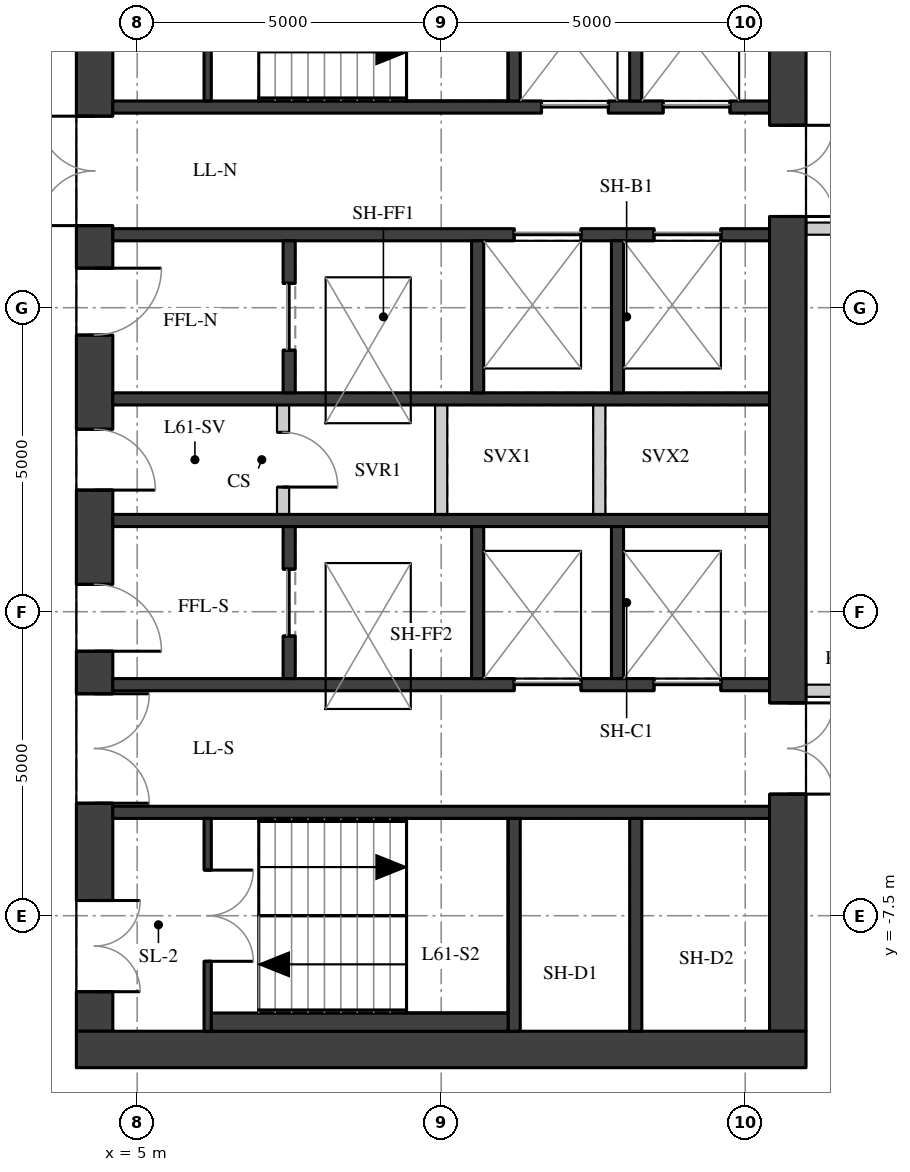
"""IFC4 building model, lengths in metres.
Left out: names, types, materials, properties, quantities, classifications, styles, units other than length and angle.
Written with IfcOpenShell. Run it as: python <this file> out.ifc"""

import sys

from ifc_helpers import new_model, si_unit, direction, frame, frame_2d, origin, place, context, subcontext, project, spatial, rectangle, extrude, element, fill, save


model = new_model("IFC4")
c1 = context("Model", 3, precision=1e-05, world=origin(), true_north=direction((0.0, 1.0)))
c2 = subcontext(c1, "Body", "Model", "MODEL_VIEW")
j1 = project(units=[si_unit("LENGTHUNIT", "METRE"), si_unit("PLANEANGLEUNIT", "RADIAN")], contexts=[c1])
p1 = place(None, origin())
s1 = spatial("IfcSite", under=j1, at=p1, CompositionType="ELEMENT")
p2 = place(p1, origin())
s2 = spatial("IfcBuilding", under=s1, at=p2, CompositionType="ELEMENT")
p3 = place(p2, frame((0.0, 0.0, 215.6)))
s3 = spatial("IfcBuildingStorey", under=s2, at=p3, CompositionType="ELEMENT", Elevation=215.6)
p4 = place(p3, frame((4.3, -9.4, 0.0), z_axis=(0.0, 0.0, 1.0), x_axis=(0.0, 1.0, 0.0)))
e1 = element("IfcWall", 1, at=p4, inside=s3, PredefinedType="SHEAR", context=c2, shape_type="SweptSolid", body=[
    extrude(rectangle(XDim=18.8, YDim=0.6, at=frame_2d((9.4, 0.0))), origin(), (0.0, 0.0, 1.0), 3.02),
])
p5 = place(p4, frame((0.65, 0.0, 0.0)))
e2 = element("IfcOpeningElement", 2, at=p5, cuts=e1, PredefinedType="OPENING", context=c2, shape_type="SweptSolid", body=[
    extrude(rectangle(XDim=1.5, YDim=2.1, at=frame_2d((0.75, 1.05))), frame((0.0, 0.31, 0.0), z_axis=(0.0, -1.0, 0.0), x_axis=(1.0, 0.0, 0.0)), (0.0, 0.0, 1.0), 0.62),
])
p6 = place(p4, frame((3.75, 0.0, 0.0)))
e3 = element("IfcOpeningElement", 3, at=p6, cuts=e1, PredefinedType="OPENING", context=c2, shape_type="SweptSolid", body=[
    extrude(rectangle(XDim=1.8, YDim=2.1, at=frame_2d((0.9, 1.05))), frame((0.0, 0.31, 0.0), z_axis=(0.0, -1.0, 0.0), x_axis=(1.0, 0.0, 0.0)), (0.0, 0.0, 1.0), 0.62),
])
p7 = place(p4, frame((6.25, 0.0, 0.0)))
e4 = element("IfcOpeningElement", 4, at=p7, cuts=e1, PredefinedType="OPENING", context=c2, shape_type="SweptSolid", body=[
    extrude(rectangle(XDim=1.1, YDim=2.1, at=frame_2d((0.55, 1.05))), frame((0.0, 0.31, 0.0), z_axis=(0.0, -1.0, 0.0), x_axis=(1.0, 0.0, 0.0)), (0.0, 0.0, 1.0), 0.62),
])
p8 = place(p4, frame((8.9, 0.0, 0.0)))
e5 = element("IfcOpeningElement", 5, at=p8, cuts=e1, PredefinedType="OPENING", context=c2, shape_type="SweptSolid", body=[
    extrude(rectangle(XDim=1.0, YDim=2.1, at=frame_2d((0.5, 1.05))), frame((0.0, 0.31, 0.0), z_axis=(0.0, -1.0, 0.0), x_axis=(1.0, 0.0, 0.0)), (0.0, 0.0, 1.0), 0.62),
])
p9 = place(p4, frame((11.45, 0.0, 0.0)))
e6 = element("IfcOpeningElement", 6, at=p9, cuts=e1, PredefinedType="OPENING", context=c2, shape_type="SweptSolid", body=[
    extrude(rectangle(XDim=1.1, YDim=2.1, at=frame_2d((0.55, 1.05))), frame((0.0, 0.31, 0.0), z_axis=(0.0, -1.0, 0.0), x_axis=(1.0, 0.0, 0.0)), (0.0, 0.0, 1.0), 0.62),
])
p10 = place(p4, frame((13.25, 0.0, 0.0)))
e7 = element("IfcOpeningElement", 7, at=p10, cuts=e1, PredefinedType="OPENING", context=c2, shape_type="SweptSolid", body=[
    extrude(rectangle(XDim=1.8, YDim=2.1, at=frame_2d((0.9, 1.05))), frame((0.0, 0.31, 0.0), z_axis=(0.0, -1.0, 0.0), x_axis=(1.0, 0.0, 0.0)), (0.0, 0.0, 1.0), 0.62),
])
p11 = place(p4, frame((16.65, 0.0, 0.0)))
e8 = element("IfcOpeningElement", 8, at=p11, cuts=e1, PredefinedType="OPENING", context=c2, shape_type="SweptSolid", body=[
    extrude(rectangle(XDim=1.5, YDim=2.1, at=frame_2d((0.75, 1.05))), frame((0.0, 0.31, 0.0), z_axis=(0.0, -1.0, 0.0), x_axis=(1.0, 0.0, 0.0)), (0.0, 0.0, 1.0), 0.62),
])
p12 = place(p3, frame((15.7, -9.4, 0.0), z_axis=(0.0, 0.0, 1.0), x_axis=(0.0, 1.0, 0.0)))
e9 = element("IfcWall", 9, at=p12, inside=s3, PredefinedType="SHEAR", context=c2, shape_type="SweptSolid", body=[
    extrude(rectangle(XDim=18.8, YDim=0.6, at=frame_2d((9.4, 0.0))), origin(), (0.0, 0.0, 1.0), 3.02),
])
p13 = place(p12, frame((13.4, 0.0, 0.0)))
e10 = element("IfcOpeningElement", 10, at=p13, cuts=e9, PredefinedType="OPENING", context=c2, shape_type="SweptSolid", body=[
    extrude(rectangle(XDim=1.5, YDim=2.1, at=frame_2d((0.75, 1.05))), frame((0.0, 0.31, 0.0), z_axis=(0.0, -1.0, 0.0), x_axis=(1.0, 0.0, 0.0)), (0.0, 0.0, 1.0), 0.62),
])
p14 = place(p12, frame((3.9, 0.0, 0.0)))
e11 = element("IfcOpeningElement", 11, at=p14, cuts=e9, PredefinedType="OPENING", context=c2, shape_type="SweptSolid", body=[
    extrude(rectangle(XDim=1.5, YDim=2.1, at=frame_2d((0.75, 1.05))), frame((0.0, 0.31, 0.0), z_axis=(0.0, -1.0, 0.0), x_axis=(1.0, 0.0, 0.0)), (0.0, 0.0, 1.0), 0.62),
])
p15 = place(p3, frame((4.0, -9.7, 0.0), z_axis=(0.0, 0.0, 1.0), x_axis=(1.0, 0.0, 0.0)))
e12 = element("IfcWall", 12, at=p15, inside=s3, PredefinedType="SHEAR", context=c2, shape_type="SweptSolid", body=[
    extrude(rectangle(XDim=12.0, YDim=0.6, at=frame_2d((6.0, 0.0))), origin(), (0.0, 0.0, 1.0), 3.02),
])
p16 = place(p3, frame((4.6, 5.8, 0.0), z_axis=(0.0, 0.0, 1.0), x_axis=(1.0, 0.0, 0.0)))
e13 = element("IfcWall", 13, at=p16, inside=s3, PredefinedType="SHEAR", context=c2, shape_type="SweptSolid", body=[
    extrude(rectangle(XDim=10.8, YDim=0.2, at=frame_2d((5.4, 0.0))), origin(), (0.0, 0.0, 1.0), 3.02),
])
p17 = place(p16, frame((7.05, 0.0, 0.0)))
e14 = element("IfcOpeningElement", 14, at=p17, cuts=e13, PredefinedType="OPENING", context=c2, shape_type="SweptSolid", body=[
    extrude(rectangle(XDim=1.1, YDim=2.1, at=frame_2d((0.55, 1.05))), frame((0.0, 0.11, 0.0), z_axis=(0.0, -1.0, 0.0), x_axis=(1.0, 0.0, 0.0)), (0.0, 0.0, 1.0), 0.22),
])
p18 = place(p16, frame((9.05, 0.0, 0.0)))
e15 = element("IfcOpeningElement", 15, at=p18, cuts=e13, PredefinedType="OPENING", context=c2, shape_type="SweptSolid", body=[
    extrude(rectangle(XDim=1.1, YDim=2.1, at=frame_2d((0.55, 1.05))), frame((0.0, 0.11, 0.0), z_axis=(0.0, -1.0, 0.0), x_axis=(1.0, 0.0, 0.0)), (0.0, 0.0, 1.0), 0.22),
])
p19 = place(p3, frame((4.6, 3.7, 0.0), z_axis=(0.0, 0.0, 1.0), x_axis=(1.0, 0.0, 0.0)))
e16 = element("IfcWall", 16, at=p19, inside=s3, PredefinedType="SHEAR", context=c2, shape_type="SweptSolid", body=[
    extrude(rectangle(XDim=10.8, YDim=0.2, at=frame_2d((5.4, 0.0))), origin(), (0.0, 0.0, 1.0), 3.02),
])
p20 = place(p19, frame((6.6, 0.0, 0.0)))
e17 = element("IfcOpeningElement", 17, at=p20, cuts=e16, PredefinedType="OPENING", context=c2, shape_type="SweptSolid", body=[
    extrude(rectangle(XDim=1.1, YDim=2.1, at=frame_2d((0.55, 1.05))), frame((0.0, 0.11, 0.0), z_axis=(0.0, -1.0, 0.0), x_axis=(1.0, 0.0, 0.0)), (0.0, 0.0, 1.0), 0.22),
])
p21 = place(p19, frame((8.9, 0.0, 0.0)))
e18 = element("IfcOpeningElement", 18, at=p21, cuts=e16, PredefinedType="OPENING", context=c2, shape_type="SweptSolid", body=[
    extrude(rectangle(XDim=1.1, YDim=2.1, at=frame_2d((0.55, 1.05))), frame((0.0, 0.11, 0.0), z_axis=(0.0, -1.0, 0.0), x_axis=(1.0, 0.0, 0.0)), (0.0, 0.0, 1.0), 0.22),
])
for number, where, z_axis, x_axis in (
    (19, (4.6, 1.0, 0.0), (0.0, 0.0, 1.0), (1.0, 0.0, 0.0)),
    (20, (4.6, -1.0, 0.0), (0.0, 0.0, 1.0), (1.0, 0.0, 0.0)),
):
    element("IfcWall", number, at=place(p3, frame(where, z_axis=z_axis, x_axis=x_axis)), inside=s3, PredefinedType="SHEAR", context=c2, shape_type="SweptSolid", body=[
        extrude(rectangle(XDim=10.8, YDim=0.2, at=frame_2d((5.4, 0.0))), origin(), (0.0, 0.0, 1.0), 3.02),
    ])
p22 = place(p3, frame((4.6, -3.7, 0.0), z_axis=(0.0, 0.0, 1.0), x_axis=(1.0, 0.0, 0.0)))
e21 = element("IfcWall", 21, at=p22, inside=s3, PredefinedType="SHEAR", context=c2, shape_type="SweptSolid", body=[
    extrude(rectangle(XDim=10.8, YDim=0.2, at=frame_2d((5.4, 0.0))), origin(), (0.0, 0.0, 1.0), 3.02),
])
p23 = place(p22, frame((6.6, 0.0, 0.0)))
e22 = element("IfcOpeningElement", 22, at=p23, cuts=e21, PredefinedType="OPENING", context=c2, shape_type="SweptSolid", body=[
    extrude(rectangle(XDim=1.1, YDim=2.1, at=frame_2d((0.55, 1.05))), frame((0.0, 0.11, 0.0), z_axis=(0.0, -1.0, 0.0), x_axis=(1.0, 0.0, 0.0)), (0.0, 0.0, 1.0), 0.22),
])
p24 = place(p22, frame((8.9, 0.0, 0.0)))
e23 = element("IfcOpeningElement", 23, at=p24, cuts=e21, PredefinedType="OPENING", context=c2, shape_type="SweptSolid", body=[
    extrude(rectangle(XDim=1.1, YDim=2.1, at=frame_2d((0.55, 1.05))), frame((0.0, 0.11, 0.0), z_axis=(0.0, -1.0, 0.0), x_axis=(1.0, 0.0, 0.0)), (0.0, 0.0, 1.0), 0.22),
])
p25 = place(p3, frame((4.6, -5.8, 0.0), z_axis=(0.0, 0.0, 1.0), x_axis=(1.0, 0.0, 0.0)))
e24 = element("IfcWall", 24, at=p25, inside=s3, PredefinedType="SHEAR", context=c2, shape_type="SweptSolid", body=[
    extrude(rectangle(XDim=10.8, YDim=0.2, at=frame_2d((5.4, 0.0))), origin(), (0.0, 0.0, 1.0), 3.02),
])
for number, where, z_axis, x_axis in (
    (25, (11.2, 5.9, 0.0), (0.0, 0.0, 1.0), (0.0, 1.0, 0.0)),
    (26, (11.2, -9.4, 0.0), (0.0, 0.0, 1.0), (0.0, 1.0, 0.0)),
    (27, (13.2, 5.9, 0.0), (0.0, 0.0, 1.0), (0.0, 1.0, 0.0)),
    (28, (13.2, -9.4, 0.0), (0.0, 0.0, 1.0), (0.0, 1.0, 0.0)),
):
    element("IfcWall", number, at=place(p3, frame(where, z_axis=z_axis, x_axis=x_axis)), inside=s3, PredefinedType="SHEAR", context=c2, shape_type="SweptSolid", body=[
        extrude(rectangle(XDim=3.5, YDim=0.2, at=frame_2d((1.75, 0.0))), origin(), (0.0, 0.0, 1.0), 3.02),
    ])
p26 = place(p3, frame((7.5, 1.1, 0.0), z_axis=(0.0, 0.0, 1.0), x_axis=(0.0, 1.0, 0.0)))
e29 = element("IfcWall", 29, at=p26, inside=s3, PredefinedType="SHEAR", context=c2, shape_type="SweptSolid", body=[
    extrude(rectangle(XDim=2.5, YDim=0.2, at=frame_2d((1.25, 0.0))), origin(), (0.0, 0.0, 1.0), 3.02),
])
p27 = place(p26, frame((0.7, 0.0, 0.0)))
e30 = element("IfcOpeningElement", 30, at=p27, cuts=e29, PredefinedType="OPENING", context=c2, shape_type="SweptSolid", body=[
    extrude(rectangle(XDim=1.1, YDim=2.1, at=frame_2d((0.55, 1.05))), frame((0.0, 0.11, 0.0), z_axis=(0.0, -1.0, 0.0), x_axis=(1.0, 0.0, 0.0)), (0.0, 0.0, 1.0), 0.22),
])
p28 = place(p3, frame((7.5, -3.6, 0.0), z_axis=(0.0, 0.0, 1.0), x_axis=(0.0, 1.0, 0.0)))
e31 = element("IfcWall", 31, at=p28, inside=s3, PredefinedType="SHEAR", context=c2, shape_type="SweptSolid", body=[
    extrude(rectangle(XDim=2.5, YDim=0.2, at=frame_2d((1.25, 0.0))), origin(), (0.0, 0.0, 1.0), 3.02),
])
p29 = place(p28, frame((0.7, 0.0, 0.0)))
e32 = element("IfcOpeningElement", 32, at=p29, cuts=e31, PredefinedType="OPENING", context=c2, shape_type="SweptSolid", body=[
    extrude(rectangle(XDim=1.1, YDim=2.1, at=frame_2d((0.55, 1.05))), frame((0.0, 0.11, 0.0), z_axis=(0.0, -1.0, 0.0), x_axis=(1.0, 0.0, 0.0)), (0.0, 0.0, 1.0), 0.22),
])
for number, where, z_axis, x_axis in (
    (33, (10.6, 1.1, 0.0), (0.0, 0.0, 1.0), (0.0, 1.0, 0.0)),
    (34, (10.6, -3.6, 0.0), (0.0, 0.0, 1.0), (0.0, 1.0, 0.0)),
    (35, (12.9, 1.1, 0.0), (0.0, 0.0, 1.0), (0.0, 1.0, 0.0)),
    (36, (12.9, -3.6, 0.0), (0.0, 0.0, 1.0), (0.0, 1.0, 0.0)),
):
    element("IfcWall", number, at=place(p3, frame(where, z_axis=z_axis, x_axis=x_axis)), inside=s3, PredefinedType="SHEAR", context=c2, shape_type="SweptSolid", body=[
        extrude(rectangle(XDim=2.5, YDim=0.2, at=frame_2d((1.25, 0.0))), origin(), (0.0, 0.0, 1.0), 3.02),
    ])
p30 = place(p3, frame((6.16, 5.9, 0.0), z_axis=(0.0, 0.0, 1.0), x_axis=(0.0, 1.0, 0.0)))
e37 = element("IfcWall", 37, at=p30, inside=s3, PredefinedType="SHEAR", context=c2, shape_type="SweptSolid", body=[
    extrude(rectangle(XDim=3.5, YDim=0.12, at=frame_2d((1.75, 0.0))), origin(), (0.0, 0.0, 1.0), 3.02),
])
p31 = place(p30, frame((0.85, 0.0, 0.0)))
e38 = element("IfcOpeningElement", 38, at=p31, cuts=e37, PredefinedType="OPENING", context=c2, shape_type="SweptSolid", body=[
    extrude(rectangle(XDim=1.5, YDim=2.1, at=frame_2d((0.75, 1.05))), frame((0.0, 0.07, 0.0), z_axis=(0.0, -1.0, 0.0), x_axis=(1.0, 0.0, 0.0)), (0.0, 0.0, 1.0), 0.14),
])
p32 = place(p3, frame((6.16, -9.4, 0.0), z_axis=(0.0, 0.0, 1.0), x_axis=(0.0, 1.0, 0.0)))
e39 = element("IfcWall", 39, at=p32, inside=s3, PredefinedType="SHEAR", context=c2, shape_type="SweptSolid", body=[
    extrude(rectangle(XDim=3.5, YDim=0.12, at=frame_2d((1.75, 0.0))), origin(), (0.0, 0.0, 1.0), 3.02),
])
p33 = place(p32, frame((1.15, 0.0, 0.0)))
e40 = element("IfcOpeningElement", 40, at=p33, cuts=e39, PredefinedType="OPENING", context=c2, shape_type="SweptSolid", body=[
    extrude(rectangle(XDim=1.5, YDim=2.1, at=frame_2d((0.75, 1.05))), frame((0.0, 0.07, 0.0), z_axis=(0.0, -1.0, 0.0), x_axis=(1.0, 0.0, 0.0)), (0.0, 0.0, 1.0), 0.14),
])
p34 = place(p3, frame((7.4, -0.9, 0.0), z_axis=(0.0, 0.0, 1.0), x_axis=(0.0, 1.0, 0.0)))
e41 = element("IfcWall", 41, at=p34, inside=s3, PredefinedType="PARTITIONING", context=c2, shape_type="SweptSolid", body=[
    extrude(rectangle(XDim=1.8, YDim=0.2, at=frame_2d((0.9, 0.0))), origin(), (0.0, 0.0, 1.0), 3.02),
])
p35 = place(p34, frame((0.45, 0.0, 0.0)))
e42 = element("IfcOpeningElement", 42, at=p35, cuts=e41, PredefinedType="OPENING", context=c2, shape_type="SweptSolid", body=[
    extrude(rectangle(XDim=0.9, YDim=2.1, at=frame_2d((0.45, 1.05))), frame((0.0, 0.11, 0.0), z_axis=(0.0, -1.0, 0.0), x_axis=(1.0, 0.0, 0.0)), (0.0, 0.0, 1.0), 0.22),
])
for number, where, z_axis, x_axis in (
    (43, (10.0, -0.9, 0.0), (0.0, 0.0, 1.0), (0.0, 1.0, 0.0)),
    (44, (12.6, -0.9, 0.0), (0.0, 0.0, 1.0), (0.0, 1.0, 0.0)),
):
    element("IfcWall", number, at=place(p3, frame(where, z_axis=z_axis, x_axis=x_axis)), inside=s3, PredefinedType="PARTITIONING", context=c2, shape_type="SweptSolid", body=[
        extrude(rectangle(XDim=1.8, YDim=0.2, at=frame_2d((0.9, 0.0))), origin(), (0.0, 0.0, 1.0), 3.02),
    ])
p36 = place(p3, frame((6.22, -9.25, 0.0), z_axis=(0.0, 0.0, 1.0), x_axis=(1.0, 0.0, 0.0)))
e45 = element("IfcWall", 45, at=p36, inside=s3, PredefinedType="PARTITIONING", context=c2, shape_type="SweptSolid", body=[
    extrude(rectangle(XDim=4.88, YDim=0.3, at=frame_2d((2.44, 0.0))), origin(), (0.0, 0.0, 1.0), 3.02),
])
p37 = place(p3, frame((17.5, 3.8, 0.0), z_axis=(0.0, 0.0, 1.0), x_axis=(-1.0, 0.0, 0.0)))
e46 = element("IfcWall", 46, at=p37, inside=s3, PredefinedType="PARTITIONING", context=c2, shape_type="SweptSolid", body=[
    extrude(rectangle(XDim=1.496, YDim=0.2, at=frame_2d((0.748, 0.0))), origin(), (0.0, 0.0, 1.0), 3.02),
])
p38 = place(p3, frame((16.004, -3.8, 0.0), z_axis=(0.0, 0.0, 1.0), x_axis=(1.0, 0.0, 0.0)))
e47 = element("IfcWall", 47, at=p38, inside=s3, PredefinedType="PARTITIONING", context=c2, shape_type="SweptSolid", body=[
    extrude(rectangle(XDim=1.496, YDim=0.2, at=frame_2d((0.748, 0.0))), origin(), (0.0, 0.0, 1.0), 2.47),
])
p39 = place(p5, origin())
e48 = element("IfcDoor", 48, at=p39, inside=s3, OperationType="DOUBLE_DOOR_SINGLE_SWING", PredefinedType="DOOR", context=c2, shape_type="SweptSolid", body=[
    extrude(rectangle(XDim=1.5, YDim=2.1, at=frame_2d((0.75, 1.05))), frame((0.0, 0.025, 0.0), z_axis=(0.0, -1.0, 0.0), x_axis=(1.0, 0.0, 0.0)), (0.0, 0.0, 1.0), 0.05),
])
fill(e2, e48)
p40 = place(p6, origin())
e49 = element("IfcDoor", 49, at=p40, inside=s3, OperationType="DOUBLE_DOOR_SINGLE_SWING", PredefinedType="DOOR", context=c2, shape_type="SweptSolid", body=[
    extrude(rectangle(XDim=1.8, YDim=2.1, at=frame_2d((0.9, 1.05))), frame((0.0, 0.025, 0.0), z_axis=(0.0, -1.0, 0.0), x_axis=(1.0, 0.0, 0.0)), (0.0, 0.0, 1.0), 0.05),
])
fill(e3, e49)
p41 = place(p7, origin())
e50 = element("IfcDoor", 50, at=p41, inside=s3, OperationType="SINGLE_SWING_RIGHT", PredefinedType="DOOR", context=c2, shape_type="SweptSolid", body=[
    extrude(rectangle(XDim=1.1, YDim=2.1, at=frame_2d((0.55, 1.05))), frame((0.0, 0.025, 0.0), z_axis=(0.0, -1.0, 0.0), x_axis=(1.0, 0.0, 0.0)), (0.0, 0.0, 1.0), 0.05),
])
fill(e4, e50)
p42 = place(p8, origin())
e51 = element("IfcDoor", 51, at=p42, inside=s3, OperationType="SINGLE_SWING_RIGHT", PredefinedType="DOOR", context=c2, shape_type="SweptSolid", body=[
    extrude(rectangle(XDim=1.0, YDim=2.1, at=frame_2d((0.5, 1.05))), frame((0.0, 0.025, 0.0), z_axis=(0.0, -1.0, 0.0), x_axis=(1.0, 0.0, 0.0)), (0.0, 0.0, 1.0), 0.05),
])
fill(e5, e51)
p43 = place(p9, origin())
e52 = element("IfcDoor", 52, at=p43, inside=s3, OperationType="SINGLE_SWING_LEFT", PredefinedType="DOOR", context=c2, shape_type="SweptSolid", body=[
    extrude(rectangle(XDim=1.1, YDim=2.1, at=frame_2d((0.55, 1.05))), frame((0.0, 0.025, 0.0), z_axis=(0.0, -1.0, 0.0), x_axis=(1.0, 0.0, 0.0)), (0.0, 0.0, 1.0), 0.05),
])
fill(e6, e52)
p44 = place(p10, origin())
e53 = element("IfcDoor", 53, at=p44, inside=s3, OperationType="DOUBLE_DOOR_SINGLE_SWING", PredefinedType="DOOR", context=c2, shape_type="SweptSolid", body=[
    extrude(rectangle(XDim=1.8, YDim=2.1, at=frame_2d((0.9, 1.05))), frame((0.0, 0.025, 0.0), z_axis=(0.0, -1.0, 0.0), x_axis=(1.0, 0.0, 0.0)), (0.0, 0.0, 1.0), 0.05),
])
fill(e7, e53)
p45 = place(p13, origin())
e54 = element("IfcDoor", 54, at=p45, inside=s3, OperationType="DOUBLE_DOOR_SINGLE_SWING", PredefinedType="DOOR", context=c2, shape_type="SweptSolid", body=[
    extrude(rectangle(XDim=1.5, YDim=2.1, at=frame_2d((0.75, 1.05))), frame((0.0, 0.025, 0.0), z_axis=(0.0, -1.0, 0.0), x_axis=(1.0, 0.0, 0.0)), (0.0, 0.0, 1.0), 0.05),
])
fill(e10, e54)
p46 = place(p14, origin())
e55 = element("IfcDoor", 55, at=p46, inside=s3, OperationType="DOUBLE_DOOR_SINGLE_SWING", PredefinedType="DOOR", context=c2, shape_type="SweptSolid", body=[
    extrude(rectangle(XDim=1.5, YDim=2.1, at=frame_2d((0.75, 1.05))), frame((0.0, 0.025, 0.0), z_axis=(0.0, -1.0, 0.0), x_axis=(1.0, 0.0, 0.0)), (0.0, 0.0, 1.0), 0.05),
])
fill(e11, e55)
p47 = place(p33, origin())
e56 = element("IfcDoor", 56, at=p47, inside=s3, OperationType="DOUBLE_DOOR_SINGLE_SWING", PredefinedType="DOOR", context=c2, shape_type="SweptSolid", body=[
    extrude(rectangle(XDim=1.5, YDim=2.1, at=frame_2d((0.75, 1.05))), frame((0.0, 0.025, 0.0), z_axis=(0.0, -1.0, 0.0), x_axis=(1.0, 0.0, 0.0)), (0.0, 0.0, 1.0), 0.05),
])
fill(e40, e56)
p48 = place(p17, origin())
e57 = element("IfcDoor", 57, at=p48, inside=s3, OperationType="DOUBLE_DOOR_SLIDING", PredefinedType="DOOR", context=c2, shape_type="SweptSolid", body=[
    extrude(rectangle(XDim=1.1, YDim=2.1, at=frame_2d((0.55, 1.05))), frame((0.0, 0.025, 0.0), z_axis=(0.0, -1.0, 0.0), x_axis=(1.0, 0.0, 0.0)), (0.0, 0.0, 1.0), 0.05),
])
fill(e14, e57)
p49 = place(p18, origin())
e58 = element("IfcDoor", 58, at=p49, inside=s3, OperationType="DOUBLE_DOOR_SLIDING", PredefinedType="DOOR", context=c2, shape_type="SweptSolid", body=[
    extrude(rectangle(XDim=1.1, YDim=2.1, at=frame_2d((0.55, 1.05))), frame((0.0, 0.025, 0.0), z_axis=(0.0, -1.0, 0.0), x_axis=(1.0, 0.0, 0.0)), (0.0, 0.0, 1.0), 0.05),
])
fill(e15, e58)
p50 = place(p20, origin())
e59 = element("IfcDoor", 59, at=p50, inside=s3, OperationType="DOUBLE_DOOR_SLIDING", PredefinedType="DOOR", context=c2, shape_type="SweptSolid", body=[
    extrude(rectangle(XDim=1.1, YDim=2.1, at=frame_2d((0.55, 1.05))), frame((0.0, 0.025, 0.0), z_axis=(0.0, -1.0, 0.0), x_axis=(1.0, 0.0, 0.0)), (0.0, 0.0, 1.0), 0.05),
])
fill(e17, e59)
p51 = place(p21, origin())
e60 = element("IfcDoor", 60, at=p51, inside=s3, OperationType="DOUBLE_DOOR_SLIDING", PredefinedType="DOOR", context=c2, shape_type="SweptSolid", body=[
    extrude(rectangle(XDim=1.1, YDim=2.1, at=frame_2d((0.55, 1.05))), frame((0.0, 0.025, 0.0), z_axis=(0.0, -1.0, 0.0), x_axis=(1.0, 0.0, 0.0)), (0.0, 0.0, 1.0), 0.05),
])
fill(e18, e60)
p52 = place(p23, origin())
e61 = element("IfcDoor", 61, at=p52, inside=s3, OperationType="DOUBLE_DOOR_SLIDING", PredefinedType="DOOR", context=c2, shape_type="SweptSolid", body=[
    extrude(rectangle(XDim=1.1, YDim=2.1, at=frame_2d((0.55, 1.05))), frame((0.0, 0.025, 0.0), z_axis=(0.0, -1.0, 0.0), x_axis=(1.0, 0.0, 0.0)), (0.0, 0.0, 1.0), 0.05),
])
fill(e22, e61)
p53 = place(p24, origin())
e62 = element("IfcDoor", 62, at=p53, inside=s3, OperationType="DOUBLE_DOOR_SLIDING", PredefinedType="DOOR", context=c2, shape_type="SweptSolid", body=[
    extrude(rectangle(XDim=1.1, YDim=2.1, at=frame_2d((0.55, 1.05))), frame((0.0, 0.025, 0.0), z_axis=(0.0, -1.0, 0.0), x_axis=(1.0, 0.0, 0.0)), (0.0, 0.0, 1.0), 0.05),
])
fill(e23, e62)
p54 = place(p27, origin())
e63 = element("IfcDoor", 63, at=p54, inside=s3, OperationType="DOUBLE_DOOR_SLIDING", PredefinedType="DOOR", context=c2, shape_type="SweptSolid", body=[
    extrude(rectangle(XDim=1.1, YDim=2.1, at=frame_2d((0.55, 1.05))), frame((0.0, 0.025, 0.0), z_axis=(0.0, -1.0, 0.0), x_axis=(1.0, 0.0, 0.0)), (0.0, 0.0, 1.0), 0.05),
])
fill(e30, e63)
p55 = place(p29, origin())
e64 = element("IfcDoor", 64, at=p55, inside=s3, OperationType="DOUBLE_DOOR_SLIDING", PredefinedType="DOOR", context=c2, shape_type="SweptSolid", body=[
    extrude(rectangle(XDim=1.1, YDim=2.1, at=frame_2d((0.55, 1.05))), frame((0.0, 0.025, 0.0), z_axis=(0.0, -1.0, 0.0), x_axis=(1.0, 0.0, 0.0)), (0.0, 0.0, 1.0), 0.05),
])
fill(e32, e64)
p56 = place(p35, origin())
e65 = element("IfcDoor", 65, at=p56, inside=s3, OperationType="SINGLE_SWING_RIGHT", PredefinedType="DOOR", context=c2, shape_type="SweptSolid", body=[
    extrude(rectangle(XDim=0.9, YDim=2.1, at=frame_2d((0.45, 1.05))), frame((0.0, 0.025, 0.0), z_axis=(0.0, -1.0, 0.0), x_axis=(1.0, 0.0, 0.0)), (0.0, 0.0, 1.0), 0.05),
])
fill(e42, e65)
save(model, sys.argv[1])
